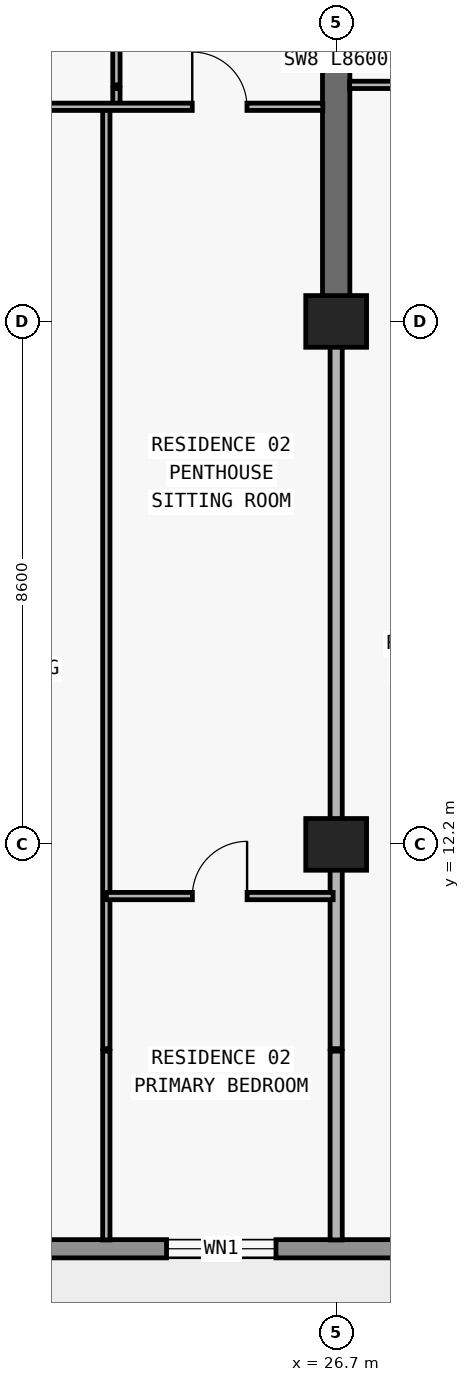
"""IFC4 building model, lengths in metres.
Left out: names, types, materials, properties, quantities, classifications, styles, units other than length and angle.
Written with IfcOpenShell. Run it as: python <this file> out.ifc"""

import sys

from ifc_helpers import new_model, si_unit, direction, frame, frame_2d, origin, origin_2d, place, context, subcontext, project, spatial, rectangle, extrude, element, fill, save


model = new_model("IFC4")
c1 = context("Model", 3, precision=1e-05, world=origin(), true_north=direction((0.0, 1.0)))
c2 = subcontext(c1, "Body", "Model", "MODEL_VIEW")
j1 = project(units=[si_unit("LENGTHUNIT", "METRE"), si_unit("PLANEANGLEUNIT", "RADIAN")], contexts=[c1])
p1 = place(None, origin())
s1 = spatial("IfcSite", under=j1, at=p1, CompositionType="ELEMENT")
p2 = place(p1, origin())
s2 = spatial("IfcBuilding", under=s1, at=p2, CompositionType="ELEMENT")
p3 = place(p2, frame((0.0, 0.0, 145.5)))
s3 = spatial("IfcBuildingStorey", under=s2, at=p3, CompositionType="ELEMENT", Elevation=145.5)
for number, where, z_axis, x_axis in (
    (1, (26.7, 12.2, 0.0), (0.0, 0.0, 1.0), (1.0, 0.0, 0.0)),
    (2, (26.7, 20.8, 0.0), (0.0, 0.0, 1.0), (1.0, 0.0, 0.0)),
):
    element("IfcColumn", number, at=place(p3, frame(where, z_axis=z_axis, x_axis=x_axis)), inside=s3, PredefinedType="COLUMN", context=c2, shape_type="SweptSolid", body=[
        extrude(rectangle(XDim=1.0, YDim=0.85, at=origin_2d()), origin(), (0.0, 0.0, 1.0), 3.05),
    ])
p4 = place(p3, frame((26.7, 20.8, 0.0), z_axis=(0.0, 0.0, 1.0), x_axis=(0.0, 1.0, 0.0)))
e3 = element("IfcWall", 3, at=p4, inside=s3, PredefinedType="SHEAR", context=c2, shape_type="SweptSolid", body=[
    extrude(rectangle(XDim=8.6, YDim=0.45, at=frame_2d((4.3, 0.0))), origin(), (0.0, 0.0, 1.0), 3.05),
])
p5 = place(p3, frame((70.1, 5.55, 0.0), z_axis=(0.0, 0.0, 1.0), x_axis=(-1.0, 0.0, 0.0)))
e4 = element("IfcWall", 4, at=p5, inside=s3, PredefinedType="STANDARD", context=c2, shape_type="SweptSolid", body=[
    extrude(rectangle(XDim=62.4, YDim=0.3, at=frame_2d((31.2, 0.0))), origin(), (0.0, 0.0, 1.0), 3.05),
])
p6 = place(p5, frame((57.226, 0.0, 0.0)))
e5 = element("IfcOpeningElement", 5, at=p6, cuts=e4, PredefinedType="OPENING", context=c2, shape_type="SweptSolid", body=[
    extrude(rectangle(XDim=2.0, YDim=2.3, at=frame_2d((1.0, 1.15))), frame((0.0, 0.16, 0.0), z_axis=(0.0, -1.0, 0.0), x_axis=(1.0, 0.0, 0.0)), (0.0, 0.0, 1.0), 0.32),
])
p7 = place(p5, frame((52.926, 0.0, 0.85)))
e6 = element("IfcOpeningElement", 6, at=p7, cuts=e4, PredefinedType="OPENING", context=c2, shape_type="SweptSolid", body=[
    extrude(rectangle(XDim=2.2, YDim=1.55, at=frame_2d((1.1, 0.775))), frame((0.0, 0.16, 0.0), z_axis=(0.0, -1.0, 0.0), x_axis=(1.0, 0.0, 0.0)), (0.0, 0.0, 1.0), 0.32),
])
p8 = place(p5, frame((48.49, 0.0, 0.0)))
e7 = element("IfcOpeningElement", 7, at=p8, cuts=e4, PredefinedType="OPENING", context=c2, shape_type="SweptSolid", body=[
    extrude(rectangle(XDim=2.0, YDim=2.3, at=frame_2d((1.0, 1.15))), frame((0.0, 0.16, 0.0), z_axis=(0.0, -1.0, 0.0), x_axis=(1.0, 0.0, 0.0)), (0.0, 0.0, 1.0), 0.32),
])
p9 = place(p5, frame((44.39, 0.0, 0.85)))
e8 = element("IfcOpeningElement", 8, at=p9, cuts=e4, PredefinedType="OPENING", context=c2, shape_type="SweptSolid", body=[
    extrude(rectangle(XDim=1.8, YDim=1.55, at=frame_2d((0.9, 0.775))), frame((0.0, 0.16, 0.0), z_axis=(0.0, -1.0, 0.0), x_axis=(1.0, 0.0, 0.0)), (0.0, 0.0, 1.0), 0.32),
])
p10 = place(p5, frame((40.426, 0.0, 0.0)))
e9 = element("IfcOpeningElement", 9, at=p10, cuts=e4, PredefinedType="OPENING", context=c2, shape_type="SweptSolid", body=[
    extrude(rectangle(XDim=2.0, YDim=2.3, at=frame_2d((1.0, 1.15))), frame((0.0, 0.16, 0.0), z_axis=(0.0, -1.0, 0.0), x_axis=(1.0, 0.0, 0.0)), (0.0, 0.0, 1.0), 0.32),
])
p11 = place(p5, frame((36.126, 0.0, 0.85)))
e10 = element("IfcOpeningElement", 10, at=p11, cuts=e4, PredefinedType="OPENING", context=c2, shape_type="SweptSolid", body=[
    extrude(rectangle(XDim=2.2, YDim=1.55, at=frame_2d((1.1, 0.775))), frame((0.0, 0.16, 0.0), z_axis=(0.0, -1.0, 0.0), x_axis=(1.0, 0.0, 0.0)), (0.0, 0.0, 1.0), 0.32),
])
p12 = place(p5, frame((32.09, 0.0, 0.0)))
e11 = element("IfcOpeningElement", 11, at=p12, cuts=e4, PredefinedType="OPENING", context=c2, shape_type="SweptSolid", body=[
    extrude(rectangle(XDim=2.0, YDim=2.3, at=frame_2d((1.0, 1.15))), frame((0.0, 0.16, 0.0), z_axis=(0.0, -1.0, 0.0), x_axis=(1.0, 0.0, 0.0)), (0.0, 0.0, 1.0), 0.32),
])
p13 = place(p5, frame((28.21, 0.0, 0.65)))
e12 = element("IfcOpeningElement", 12, at=p13, cuts=e4, PredefinedType="OPENING", context=c2, shape_type="SweptSolid", body=[
    extrude(rectangle(XDim=2.6, YDim=1.85, at=frame_2d((1.3, 0.925))), frame((0.0, 0.16, 0.0), z_axis=(0.0, -1.0, 0.0), x_axis=(1.0, 0.0, 0.0)), (0.0, 0.0, 1.0), 0.32),
])
p14 = place(p5, frame((22.1, 0.0, 0.85)))
e13 = element("IfcOpeningElement", 13, at=p14, cuts=e4, PredefinedType="OPENING", context=c2, shape_type="SweptSolid", body=[
    extrude(rectangle(XDim=2.2, YDim=1.55, at=frame_2d((1.1, 0.775))), frame((0.0, 0.16, 0.0), z_axis=(0.0, -1.0, 0.0), x_axis=(1.0, 0.0, 0.0)), (0.0, 0.0, 1.0), 0.32),
])
p15 = place(p5, frame((16.09, 0.0, 0.0)))
e14 = element("IfcOpeningElement", 14, at=p15, cuts=e4, PredefinedType="OPENING", context=c2, shape_type="SweptSolid", body=[
    extrude(rectangle(XDim=2.0, YDim=2.3, at=frame_2d((1.0, 1.15))), frame((0.0, 0.16, 0.0), z_axis=(0.0, -1.0, 0.0), x_axis=(1.0, 0.0, 0.0)), (0.0, 0.0, 1.0), 0.32),
])
p16 = place(p5, frame((11.41, 0.0, 0.65)))
e15 = element("IfcOpeningElement", 15, at=p16, cuts=e4, PredefinedType="OPENING", context=c2, shape_type="SweptSolid", body=[
    extrude(rectangle(XDim=2.6, YDim=1.85, at=frame_2d((1.3, 0.925))), frame((0.0, 0.16, 0.0), z_axis=(0.0, -1.0, 0.0), x_axis=(1.0, 0.0, 0.0)), (0.0, 0.0, 1.0), 0.32),
])
p17 = place(p5, frame((5.3, 0.0, 0.85)))
e16 = element("IfcOpeningElement", 16, at=p17, cuts=e4, PredefinedType="OPENING", context=c2, shape_type="SweptSolid", body=[
    extrude(rectangle(XDim=2.2, YDim=1.55, at=frame_2d((1.1, 0.775))), frame((0.0, 0.16, 0.0), z_axis=(0.0, -1.0, 0.0), x_axis=(1.0, 0.0, 0.0)), (0.0, 0.0, 1.0), 0.32),
])
p18 = place(p3, frame((22.92, 5.695, 0.0), z_axis=(0.0, 0.0, 1.0), x_axis=(0.0, 1.0, 0.0)))
e17 = element("IfcWall", 17, at=p18, inside=s3, PredefinedType="PARTITIONING", context=c2, shape_type="SweptSolid", body=[
    extrude(rectangle(XDim=3.105, YDim=0.12, at=frame_2d((1.552, 0.0))), origin(), (0.0, 0.0, 1.0), 3.05),
])
p19 = place(p3, frame((22.92, 8.84, 0.0), z_axis=(0.0, 0.0, 1.0), x_axis=(0.0, 1.0, 0.0)))
e18 = element("IfcWall", 18, at=p19, inside=s3, PredefinedType="PARTITIONING", context=c2, shape_type="SweptSolid", body=[
    extrude(rectangle(XDim=15.49, YDim=0.12, at=frame_2d((7.745, 0.0))), origin(), (0.0, 0.0, 1.0), 3.05),
])
p20 = place(p3, frame((23.086, 24.335, 0.0), z_axis=(0.0, 0.0, 1.0), x_axis=(0.0, 1.0, 0.0)))
e19 = element("IfcWall", 19, at=p20, inside=s3, PredefinedType="PARTITIONING", context=c2, shape_type="SweptSolid", body=[
    extrude(rectangle(XDim=0.295, YDim=0.12, at=frame_2d((0.147, 0.0))), origin(), (0.0, 0.0, 1.0), 3.05),
])
p21 = place(p3, frame((23.086, 24.69, 0.0), z_axis=(0.0, 0.0, 1.0), x_axis=(0.0, 1.0, 0.0)))
e20 = element("IfcWall", 20, at=p21, inside=s3, PredefinedType="PARTITIONING", context=c2, shape_type="SweptSolid", body=[
    extrude(rectangle(XDim=4.79, YDim=0.12, at=frame_2d((2.395, 0.0))), origin(), (0.0, 0.0, 1.0), 3.05),
])
p22 = place(p21, frame((1.945, 0.0, 0.0)))
e21 = element("IfcOpeningElement", 21, at=p22, cuts=e20, PredefinedType="OPENING", context=c2, shape_type="SweptSolid", body=[
    extrude(rectangle(XDim=0.9, YDim=2.15, at=frame_2d((0.45, 1.075))), frame((0.0, 0.07, 0.0), z_axis=(0.0, -1.0, 0.0), x_axis=(1.0, 0.0, 0.0)), (0.0, 0.0, 1.0), 0.14),
])
p23 = place(p3, frame((26.7, 5.695, 0.0), z_axis=(0.0, 0.0, 1.0), x_axis=(0.0, 1.0, 0.0)))
e22 = element("IfcWall", 22, at=p23, inside=s3, PredefinedType="PARTITIONING", context=c2, shape_type="SweptSolid", body=[
    extrude(rectangle(XDim=3.105, YDim=0.2, at=frame_2d((1.552, 0.0))), origin(), (0.0, 0.0, 1.0), 3.05),
])
p24 = place(p3, frame((26.7, 8.84, 0.0), z_axis=(0.0, 0.0, 1.0), x_axis=(0.0, 1.0, 0.0)))
e23 = element("IfcWall", 23, at=p24, inside=s3, PredefinedType="PARTITIONING", context=c2, shape_type="SweptSolid", body=[
    extrude(rectangle(XDim=11.955, YDim=0.2, at=frame_2d((5.978, 0.0))), origin(), (0.0, 0.0, 1.0), 2.174),
])
p25 = place(p3, frame((22.92, 11.35, 0.0), z_axis=(0.0, 0.0, 1.0), x_axis=(1.0, 0.0, 0.0)))
e24 = element("IfcWall", 24, at=p25, inside=s3, PredefinedType="PARTITIONING", context=c2, shape_type="SweptSolid", body=[
    extrude(rectangle(XDim=3.73, YDim=0.12, at=frame_2d((1.865, 0.0))), origin(), (0.0, 0.0, 1.0), 3.05),
])
p26 = place(p25, frame((1.415, 0.0, 0.0)))
e25 = element("IfcOpeningElement", 25, at=p26, cuts=e24, PredefinedType="OPENING", context=c2, shape_type="SweptSolid", body=[
    extrude(rectangle(XDim=0.9, YDim=2.15, at=frame_2d((0.45, 1.075))), frame((0.0, 0.07, 0.0), z_axis=(0.0, -1.0, 0.0), x_axis=(1.0, 0.0, 0.0)), (0.0, 0.0, 1.0), 0.14),
])
p27 = place(p3, frame((18.3, 24.33, 0.0), z_axis=(0.0, 0.0, 1.0), x_axis=(1.0, 0.0, 0.0)))
e26 = element("IfcWall", 26, at=p27, inside=s3, PredefinedType="PARTITIONING", context=c2, shape_type="SweptSolid", body=[
    extrude(rectangle(XDim=8.18, YDim=0.12, at=frame_2d((4.09, 0.0))), origin(), (0.0, 0.0, 1.0), 3.05),
])
p28 = place(p27, frame((1.86, 0.0, 0.0)))
e27 = element("IfcOpeningElement", 27, at=p28, cuts=e26, PredefinedType="OPENING", context=c2, shape_type="SweptSolid", body=[
    extrude(rectangle(XDim=0.9, YDim=2.15, at=frame_2d((0.45, 1.075))), frame((0.0, 0.07, 0.0), z_axis=(0.0, -1.0, 0.0), x_axis=(1.0, 0.0, 0.0)), (0.0, 0.0, 1.0), 0.14),
])
p29 = place(p27, frame((6.033, 0.0, 0.0)))
e28 = element("IfcOpeningElement", 28, at=p29, cuts=e26, PredefinedType="OPENING", context=c2, shape_type="SweptSolid", body=[
    extrude(rectangle(XDim=0.9, YDim=2.15, at=frame_2d((0.45, 1.075))), frame((0.0, 0.07, 0.0), z_axis=(0.0, -1.0, 0.0), x_axis=(1.0, 0.0, 0.0)), (0.0, 0.0, 1.0), 0.14),
])
p30 = place(p3, frame((26.92, 24.69, 0.0), z_axis=(0.0, 0.0, 1.0), x_axis=(1.0, 0.0, 0.0)))
e29 = element("IfcWall", 29, at=p30, inside=s3, PredefinedType="PARTITIONING", context=c2, shape_type="SweptSolid", body=[
    extrude(rectangle(XDim=8.18, YDim=0.12, at=frame_2d((4.09, 0.0))), origin(), (0.0, 0.0, 1.0), 3.05),
])
p31 = place(p30, frame((1.414, 0.0, 0.0)))
e30 = element("IfcOpeningElement", 30, at=p31, cuts=e29, PredefinedType="OPENING", context=c2, shape_type="SweptSolid", body=[
    extrude(rectangle(XDim=0.9, YDim=2.15, at=frame_2d((0.45, 1.075))), frame((0.0, 0.07, 0.0), z_axis=(0.0, -1.0, 0.0), x_axis=(1.0, 0.0, 0.0)), (0.0, 0.0, 1.0), 0.14),
])
p32 = place(p30, frame((5.673, 0.0, 0.0)))
e31 = element("IfcOpeningElement", 31, at=p32, cuts=e29, PredefinedType="OPENING", context=c2, shape_type="SweptSolid", body=[
    extrude(rectangle(XDim=0.9, YDim=2.15, at=frame_2d((0.45, 1.075))), frame((0.0, 0.07, 0.0), z_axis=(0.0, -1.0, 0.0), x_axis=(1.0, 0.0, 0.0)), (0.0, 0.0, 1.0), 0.14),
])
p33 = place(p9, origin())
e32 = element("IfcWindow", 32, at=p33, inside=s3, PartitioningType="SINGLE_PANEL", PredefinedType="WINDOW", context=c2, shape_type="SweptSolid", body=[
    extrude(rectangle(XDim=1.8, YDim=1.55, at=frame_2d((0.9, 0.775))), frame((0.0, 0.03, 0.0), z_axis=(0.0, -1.0, 0.0), x_axis=(1.0, 0.0, 0.0)), (0.0, 0.0, 1.0), 0.06),
])
fill(e8, e32)
p34 = place(p29, origin())
e33 = element("IfcDoor", 33, at=p34, inside=s3, OperationType="SINGLE_SWING_LEFT", PredefinedType="DOOR", context=c2, shape_type="SweptSolid", body=[
    extrude(rectangle(XDim=0.9, YDim=2.15, at=frame_2d((0.45, 1.075))), frame((0.0, 0.025, 0.0), z_axis=(0.0, -1.0, 0.0), x_axis=(1.0, 0.0, 0.0)), (0.0, 0.0, 1.0), 0.05),
])
fill(e28, e33)
p35 = place(p26, origin())
e34 = element("IfcDoor", 34, at=p35, inside=s3, OperationType="SINGLE_SWING_RIGHT", PredefinedType="DOOR", context=c2, shape_type="SweptSolid", body=[
    extrude(rectangle(XDim=0.9, YDim=2.15, at=frame_2d((0.45, 1.075))), frame((0.0, 0.025, 0.0), z_axis=(0.0, -1.0, 0.0), x_axis=(1.0, 0.0, 0.0)), (0.0, 0.0, 1.0), 0.05),
])
fill(e25, e34)
save(model, sys.argv[1])
